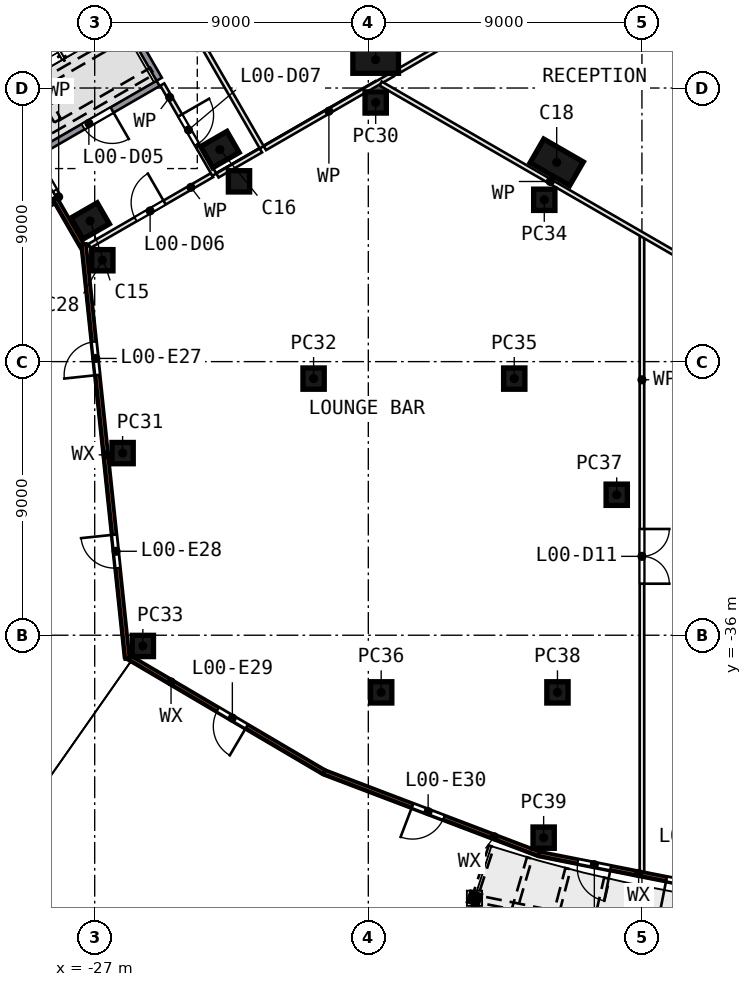
"""IFC4 building model, lengths in metres.
Left out: names, types, materials, properties, quantities, classifications, styles, units other than length and angle.
Written with IfcOpenShell. Run it as: python <this file> out.ifc"""

import sys

from ifc_helpers import new_model, si_unit, direction, frame, frame_2d, origin, origin_2d, place, context, subcontext, project, spatial, rectangle, hollow_rectangle, extrude, element, fill, save


model = new_model("IFC4")
c1 = context("Model", 3, precision=1e-05, world=origin(), true_north=direction((0.0, 1.0)))
c2 = subcontext(c1, "Body", "Model", "MODEL_VIEW")
j1 = project(units=[si_unit("LENGTHUNIT", "METRE"), si_unit("PLANEANGLEUNIT", "RADIAN")], contexts=[c1])
p1 = place(None, origin())
s1 = spatial("IfcSite", under=j1, at=p1, CompositionType="ELEMENT")
p2 = place(p1, origin())
s2 = spatial("IfcBuilding", under=s1, at=p2, CompositionType="ELEMENT")
p3 = place(p2, origin())
s3 = spatial("IfcBuildingStorey", under=s2, at=p3, CompositionType="ELEMENT", Elevation=0.0)
for number, where, z_axis, x_axis in (
    (1, (-27.151, -22.373, 0.0), (0.0, 0.0, 1.0), (0.866, 0.5, 0.0)),
    (2, (-22.883, -20.024, 0.0), (0.0, 0.0, 1.0), (0.866, 0.5, 0.0)),
):
    element("IfcColumn", number, at=place(p3, frame(where, z_axis=z_axis, x_axis=x_axis)), inside=s3, PredefinedType="COLUMN", context=c2, shape_type="SweptSolid", body=[
        extrude(rectangle(XDim=1.0, YDim=0.8, at=origin_2d()), origin(), (0.0, 0.0, 1.0), 7.55),
    ])
for number, where, z_axis, x_axis in (
    (3, (-17.758, -17.065, 0.0), (0.0, 0.0, 1.0), (-1.0, 0.0, 0.0)),
    (4, (-11.804, -20.445, 0.0), (0.0, 0.0, 1.0), (0.866, -0.5, 0.0)),
):
    element("IfcColumn", number, at=place(p3, frame(where, z_axis=z_axis, x_axis=x_axis)), inside=s3, PredefinedType="COLUMN", context=c2, shape_type="SweptSolid", body=[
        extrude(rectangle(XDim=1.5, YDim=0.9, at=origin_2d()), origin(), (0.0, 0.0, 1.0), 7.55),
    ])
for number, where, z_axis, x_axis in (
    (5, (-26.749, -23.665, 0.0), (0.0, 0.0, 1.0), (0.0, -1.0, 0.0)),
    (6, (-22.253, -21.07, 0.0), (0.0, 0.0, 1.0), (0.0, -1.0, 0.0)),
    (7, (-17.758, -18.474, 0.0), (0.0, 0.0, 1.0), (0.0, -1.0, 0.0)),
    (8, (-26.082, -30.009, 0.0), (0.0, 0.0, 1.0), (0.0, -1.0, 0.0)),
    (9, (-19.8, -27.558, 0.0), (0.0, 0.0, 1.0), (0.0, -1.0, 0.0)),
    (10, (-25.416, -36.353, 0.0), (0.0, 0.0, 1.0), (0.0, -1.0, 0.0)),
    (11, (-12.212, -21.676, 0.0), (0.0, 0.0, 1.0), (0.0, -1.0, 0.0)),
    (12, (-13.2, -27.558, 0.0), (0.0, 0.0, 1.0), (0.0, -1.0, 0.0)),
    (13, (-17.577, -37.88, 0.0), (0.0, 0.0, 1.0), (0.0, -1.0, 0.0)),
    (14, (-9.83, -31.379, 0.0), (0.0, 0.0, 1.0), (0.0, -1.0, 0.0)),
    (15, (-11.779, -37.88, 0.0), (0.0, 0.0, 1.0), (0.0, -1.0, 0.0)),
    (16, (-12.233, -42.658, 0.0), (0.0, 0.0, 1.0), (0.0, -1.0, 0.0)),
):
    element("IfcColumn", number, at=place(p3, frame(where, z_axis=z_axis, x_axis=x_axis)), inside=s3, PredefinedType="COLUMN", context=c2, shape_type="SweptSolid", body=[
        extrude(rectangle(XDim=0.7, YDim=0.7, at=origin_2d()), origin(), (0.0, 0.0, 1.0), 8.0),
    ])
p4 = place(p3, frame((-14.508, -44.652, -0.06), z_axis=(0.0, 0.0, 1.0), x_axis=(-0.309016994, -0.951056516, 0.0)))
e17 = element("IfcColumn", 17, at=p4, inside=s3, PredefinedType="COLUMN", context=c2, shape_type="SweptSolid", body=[
    extrude(hollow_rectangle(XDim=0.305, YDim=0.305, WallThickness=0.015, InnerFilletRadius=0.007, OuterFilletRadius=0.022, at=origin_2d()), origin(), (0.0, 0.0, 1.0), 5.453),
])
p5 = place(p3, frame((-29.78, -22.54, 0.0), z_axis=(0.0, 0.0, 1.0), x_axis=(0.865989634, 0.500061949, 0.0)))
e18 = element("IfcWall", 18, at=p5, inside=s3, PredefinedType="SOLIDWALL", context=c2, shape_type="SweptSolid", body=[
    extrude(rectangle(XDim=1.66, YDim=0.14, at=frame_2d((0.83, 0.0))), origin(), (0.0, 0.0, 1.0), 7.55),
])
p6 = place(p3, frame((-28.317, -21.614, 0.0), z_axis=(0.0, 0.0, 1.0), x_axis=(0.499983248, -0.866035075, 0.0)))
e19 = element("IfcWall", 19, at=p6, inside=s3, PredefinedType="SOLIDWALL", context=c2, shape_type="SweptSolid", body=[
    extrude(rectangle(XDim=1.783, YDim=0.14, at=frame_2d((0.891, 0.0))), origin(), (0.0, 0.0, 1.0), 7.55),
])
p7 = place(p3, frame((-25.925, -36.773, 0.0), z_axis=(0.0, 0.0, 1.0), x_axis=(-0.104443805, 0.99453079, 0.0)))
e20 = element("IfcWall", 20, at=p7, inside=s3, PredefinedType="SOLIDWALL", context=c2, shape_type="SweptSolid", body=[
    extrude(rectangle(XDim=13.712, YDim=0.14, at=frame_2d((6.856, 0.0))), origin(), (0.0, 0.0, 1.0), 7.55),
])
p8 = place(p7, frame((9.383, 0.0, 0.0)))
e21 = element("IfcOpeningElement", 21, at=p8, cuts=e20, PredefinedType="OPENING", context=c2, shape_type="SweptSolid", body=[
    extrude(rectangle(XDim=1.1, YDim=2.4, at=frame_2d((0.55, 1.2))), frame((0.0, 0.08, 0.0), z_axis=(0.0, -1.0, 0.0), x_axis=(1.0, 0.0, 0.0)), (0.0, 0.0, 1.0), 0.16),
])
p9 = place(p7, frame((3.004, 0.0, 0.0)))
e22 = element("IfcOpeningElement", 22, at=p9, cuts=e20, PredefinedType="OPENING", context=c2, shape_type="SweptSolid", body=[
    extrude(rectangle(XDim=1.1, YDim=2.4, at=frame_2d((0.55, 1.2))), frame((0.0, 0.08, 0.0), z_axis=(0.0, -1.0, 0.0), x_axis=(1.0, 0.0, 0.0)), (0.0, 0.0, 1.0), 0.16),
])
p10 = place(p3, frame((-19.442, -40.506, 0.0), z_axis=(0.0, 0.0, 1.0), x_axis=(-0.861885317, 0.507103244, 0.0)))
e23 = element("IfcWall", 23, at=p10, inside=s3, PredefinedType="SOLIDWALL", context=c2, shape_type="SweptSolid", body=[
    extrude(rectangle(XDim=7.445, YDim=0.14, at=frame_2d((3.723, 0.0))), origin(), (0.0, 0.0, 1.0), 7.55),
])
p11 = place(p10, frame((2.966, 0.0, 0.0)))
e24 = element("IfcOpeningElement", 24, at=p11, cuts=e23, PredefinedType="OPENING", context=c2, shape_type="SweptSolid", body=[
    extrude(rectangle(XDim=1.1, YDim=2.4, at=frame_2d((0.55, 1.2))), frame((0.0, 0.08, 0.0), z_axis=(0.0, -1.0, 0.0), x_axis=(1.0, 0.0, 0.0)), (0.0, 0.0, 1.0), 0.16),
])
p12 = place(p3, frame((-12.38, -43.191, 0.0), z_axis=(0.0, 0.0, 1.0), x_axis=(-0.934676196, 0.355500224, 0.0)))
e25 = element("IfcWall", 25, at=p12, inside=s3, PredefinedType="SOLIDWALL", context=c2, shape_type="SweptSolid", body=[
    extrude(rectangle(XDim=7.567, YDim=0.14, at=frame_2d((3.784, 0.0))), origin(), (0.0, 0.0, 1.0), 7.55),
])
p13 = place(p12, frame((3.358, 0.0, 0.0)))
e26 = element("IfcOpeningElement", 26, at=p13, cuts=e25, PredefinedType="OPENING", context=c2, shape_type="SweptSolid", body=[
    extrude(rectangle(XDim=1.1, YDim=2.4, at=frame_2d((0.55, 1.2))), frame((0.0, 0.08, 0.0), z_axis=(0.0, -1.0, 0.0), x_axis=(1.0, 0.0, 0.0)), (0.0, 0.0, 1.0), 0.16),
])
p14 = place(p3, frame((-4.967, -44.655, 0.0), z_axis=(0.0, 0.0, 1.0), x_axis=(-0.981028519, 0.193863469, 0.0)))
e27 = element("IfcWall", 27, at=p14, inside=s3, PredefinedType="SOLIDWALL", context=c2, shape_type="SweptSolid", body=[
    extrude(rectangle(XDim=7.567, YDim=0.14, at=frame_2d((3.784, 0.0))), origin(), (0.0, 0.0, 1.0), 7.55),
])
p15 = place(p14, frame((5.157, 0.0, 0.0)))
e28 = element("IfcOpeningElement", 28, at=p15, cuts=e27, PredefinedType="OPENING", context=c2, shape_type="SweptSolid", body=[
    extrude(rectangle(XDim=1.1, YDim=2.4, at=frame_2d((0.55, 1.2))), frame((0.0, 0.08, 0.0), z_axis=(0.0, -1.0, 0.0), x_axis=(1.0, 0.0, 0.0)), (0.0, 0.0, 1.0), 0.16),
])
p16 = place(p14, frame((1.088, 0.0, 0.0)))
e29 = element("IfcOpeningElement", 29, at=p16, cuts=e27, PredefinedType="OPENING", context=c2, shape_type="SweptSolid", body=[
    extrude(rectangle(XDim=2.2, YDim=2.4, at=frame_2d((1.1, 1.2))), frame((0.0, 0.08, 0.0), z_axis=(0.0, -1.0, 0.0), x_axis=(1.0, 0.0, 0.0)), (0.0, 0.0, 1.0), 0.16),
])
p17 = place(p3, frame((-28.162, -21.623, 0.0), z_axis=(0.0, 0.0, 1.0), x_axis=(-0.499877454, 0.866096144, 0.0)))
e30 = element("IfcWall", 30, at=p17, inside=s3, PredefinedType="PARTITIONING", context=c2, shape_type="SweptSolid", body=[
    extrude(rectangle(XDim=1.545, YDim=0.15, at=frame_2d((0.773, 0.0))), origin(), (0.0, 0.0, 1.0), 7.55),
])
p18 = place(p17, frame((0.295, 0.0, 0.0)))
e31 = element("IfcOpeningElement", 31, at=p18, cuts=e30, PredefinedType="OPENING", context=c2, shape_type="SweptSolid", body=[
    extrude(rectangle(XDim=1.1, YDim=2.1, at=frame_2d((0.55, 1.05))), frame((0.0, 0.085, 0.0), z_axis=(0.0, -1.0, 0.0), x_axis=(1.0, 0.0, 0.0)), (0.0, 0.0, 1.0), 0.17),
])
p19 = place(p3, frame((-24.914, -17.848, 0.0), z_axis=(0.0, 0.0, 1.0), x_axis=(-0.86601677, -0.500014953, 0.0)))
e32 = element("IfcWall", 32, at=p19, inside=s3, PredefinedType="SOLIDWALL", context=c2, shape_type="SweptSolid", body=[
    extrude(rectangle(XDim=4.6, YDim=0.2, at=frame_2d((2.3, 0.0))), origin(), (0.0, 0.0, 1.0), 7.55),
])
p20 = place(p19, frame((1.75, 0.0, 0.0)))
e33 = element("IfcOpeningElement", 33, at=p20, cuts=e32, PredefinedType="OPENING", context=c2, shape_type="SweptSolid", body=[
    extrude(rectangle(XDim=1.1, YDim=2.1, at=frame_2d((0.55, 1.05))), frame((0.0, 0.11, 0.0), z_axis=(0.0, -1.0, 0.0), x_axis=(1.0, 0.0, 0.0)), (0.0, 0.0, 1.0), 0.22),
])
p21 = place(p3, frame((-27.169, -23.192, 0.0), z_axis=(0.0, 0.0, 1.0), x_axis=(0.866011597, 0.500023913, 0.0)))
e34 = element("IfcWall", 34, at=p21, inside=s3, PredefinedType="PARTITIONING", context=c2, shape_type="SweptSolid", body=[
    extrude(rectangle(XDim=4.65, YDim=0.15, at=frame_2d((2.325, 0.0))), origin(), (0.0, 0.0, 1.0), 7.55),
])
p22 = place(p21, frame((1.75, 0.0, 0.0)))
e35 = element("IfcOpeningElement", 35, at=p22, cuts=e34, PredefinedType="OPENING", context=c2, shape_type="SweptSolid", body=[
    extrude(rectangle(XDim=1.1, YDim=2.1, at=frame_2d((0.55, 1.05))), frame((0.0, 0.085, 0.0), z_axis=(0.0, -1.0, 0.0), x_axis=(1.0, 0.0, 0.0)), (0.0, 0.0, 1.0), 0.17),
])
p23 = place(p3, frame((-24.877, -17.712, 0.0), z_axis=(0.0, 0.0, 1.0), x_axis=(-0.499984537, 0.866034331, 0.0)))
e36 = element("IfcWall", 36, at=p23, inside=s3, PredefinedType="SOLIDWALL", context=c2, shape_type="SweptSolid", body=[
    extrude(rectangle(XDim=9.3, YDim=0.2, at=frame_2d((4.65, 0.0))), origin(), (0.0, 0.0, 1.0), 7.55),
])
p24 = place(p3, frame((-24.777, -17.885, 0.0), z_axis=(0.0, 0.0, 1.0), x_axis=(0.500041249, -0.866001587, 0.0)))
e37 = element("IfcWall", 37, at=p24, inside=s3, PredefinedType="PARTITIONING", context=c2, shape_type="SweptSolid", body=[
    extrude(rectangle(XDim=3.425, YDim=0.15, at=frame_2d((1.712, 0.0))), origin(), (0.0, 0.0, 1.0), 7.55),
])
p25 = place(p24, frame((1.175, 0.0, 0.0)))
e38 = element("IfcOpeningElement", 38, at=p25, cuts=e37, PredefinedType="OPENING", context=c2, shape_type="SweptSolid", body=[
    extrude(rectangle(XDim=1.1, YDim=2.1, at=frame_2d((0.55, 1.05))), frame((0.0, 0.085, 0.0), z_axis=(0.0, -1.0, 0.0), x_axis=(1.0, 0.0, 0.0)), (0.0, 0.0, 1.0), 0.17),
])
p26 = place(p3, frame((-22.962, -20.878, 0.0), z_axis=(0.0, 0.0, 1.0), x_axis=(0.866040212, 0.499974351, 0.0)))
e39 = element("IfcWall", 39, at=p26, inside=s3, PredefinedType="PARTITIONING", context=c2, shape_type="SweptSolid", body=[
    extrude(rectangle(XDim=1.65, YDim=0.15, at=frame_2d((0.825, 0.0))), origin(), (0.0, 0.0, 1.0), 7.55),
])
p27 = place(p3, frame((-21.506, -19.951, 0.0), z_axis=(0.0, 0.0, 1.0), x_axis=(-0.499998298, 0.866026387, 0.0)))
e40 = element("IfcWall", 40, at=p27, inside=s3, PredefinedType="PARTITIONING", context=c2, shape_type="SweptSolid", body=[
    extrude(rectangle(XDim=13.05, YDim=0.15, at=frame_2d((6.525, 0.0))), origin(), (0.0, 0.0, 1.0), 7.55),
])
p28 = place(p27, frame((5.55, 0.0, 0.0)))
e41 = element("IfcOpeningElement", 41, at=p28, cuts=e40, PredefinedType="OPENING", context=c2, shape_type="SweptSolid", body=[
    extrude(rectangle(XDim=1.8, YDim=2.1, at=frame_2d((0.9, 1.05))), frame((0.0, 0.085, 0.0), z_axis=(0.0, -1.0, 0.0), x_axis=(1.0, 0.0, 0.0)), (0.0, 0.0, 1.0), 0.17),
])
p29 = place(p3, frame((-21.404, -19.979, 0.0), z_axis=(0.0, 0.0, 1.0), x_axis=(0.866005103, 0.50003516, 0.0)))
e42 = element("IfcWall", 42, at=p29, inside=s3, PredefinedType="PARTITIONING", context=c2, shape_type="SweptSolid", body=[
    extrude(rectangle(XDim=4.866, YDim=0.15, at=frame_2d((2.433, 0.0))), origin(), (0.0, 0.0, 1.0), 7.55),
])
p30 = place(p3, frame((-16.978, -17.424, 0.0), z_axis=(0.0, 0.0, 1.0), x_axis=(0.866016603, 0.500015243, 0.0)))
e43 = element("IfcWall", 43, at=p30, inside=s3, PredefinedType="PARTITIONING", context=c2, shape_type="SweptSolid", body=[
    extrude(rectangle(XDim=5.582, YDim=0.15, at=frame_2d((2.791, 0.0))), origin(), (0.0, 0.0, 1.0), 7.55),
])
p31 = place(p3, frame((-9.0, -22.89, 0.0), z_axis=(0.0, 0.0, 1.0), x_axis=(0.0, -1.0, 0.0)))
e44 = element("IfcWall", 44, at=p31, inside=s3, PredefinedType="PARTITIONING", context=c2, shape_type="SweptSolid", body=[
    extrude(rectangle(XDim=20.965, YDim=0.15, at=frame_2d((10.482, 0.0))), origin(), (0.0, 0.0, 1.0), 7.55),
])
p32 = place(p31, frame((9.615, 0.0, 0.0)))
e45 = element("IfcOpeningElement", 45, at=p32, cuts=e44, PredefinedType="OPENING", context=c2, shape_type="SweptSolid", body=[
    extrude(rectangle(XDim=1.8, YDim=2.1, at=frame_2d((0.9, 1.05))), frame((0.0, 0.085, 0.0), z_axis=(0.0, -1.0, 0.0), x_axis=(1.0, 0.0, 0.0)), (0.0, 0.0, 1.0), 0.17),
])
p33 = place(p3, frame((-6.435, -24.296, 0.0), z_axis=(0.0, 0.0, 1.0), x_axis=(-0.866023714, 0.500002927, 0.0)))
e46 = element("IfcWall", 46, at=p33, inside=s3, PredefinedType="PARTITIONING", context=c2, shape_type="SweptSolid", body=[
    extrude(rectangle(XDim=12.885, YDim=0.15, at=frame_2d((6.442, 0.0))), origin(), (0.0, 0.0, 1.0), 7.55),
])
p34 = place(p3, frame((-4.823, -17.721, 0.0), z_axis=(0.0, 0.0, 1.0), x_axis=(-0.866037142, 0.499979668, 0.0)))
e47 = element("IfcWall", 47, at=p34, inside=s3, PredefinedType="PARTITIONING", context=c2, shape_type="SweptSolid", body=[
    extrude(rectangle(XDim=9.367, YDim=0.15, at=frame_2d((4.683, 0.0))), origin(), (0.0, 0.0, 1.0), 7.55),
])
p35 = place(p8, origin())
e48 = element("IfcDoor", 48, at=p35, inside=s3, OperationType="SINGLE_SWING_LEFT", PredefinedType="DOOR", context=c2, shape_type="SweptSolid", body=[
    extrude(rectangle(XDim=1.1, YDim=2.4, at=frame_2d((0.55, 1.2))), frame((0.0, 0.025, 0.0), z_axis=(0.0, -1.0, 0.0), x_axis=(1.0, 0.0, 0.0)), (0.0, 0.0, 1.0), 0.05),
])
fill(e21, e48)
p36 = place(p9, origin())
e49 = element("IfcDoor", 49, at=p36, inside=s3, OperationType="SINGLE_SWING_RIGHT", PredefinedType="DOOR", context=c2, shape_type="SweptSolid", body=[
    extrude(rectangle(XDim=1.1, YDim=2.4, at=frame_2d((0.55, 1.2))), frame((0.0, 0.025, 0.0), z_axis=(0.0, -1.0, 0.0), x_axis=(1.0, 0.0, 0.0)), (0.0, 0.0, 1.0), 0.05),
])
fill(e22, e49)
p37 = place(p11, origin())
e50 = element("IfcDoor", 50, at=p37, inside=s3, OperationType="SINGLE_SWING_LEFT", PredefinedType="DOOR", context=c2, shape_type="SweptSolid", body=[
    extrude(rectangle(XDim=1.1, YDim=2.4, at=frame_2d((0.55, 1.2))), frame((0.0, 0.025, 0.0), z_axis=(0.0, -1.0, 0.0), x_axis=(1.0, 0.0, 0.0)), (0.0, 0.0, 1.0), 0.05),
])
fill(e24, e50)
p38 = place(p13, origin())
e51 = element("IfcDoor", 51, at=p38, inside=s3, OperationType="SINGLE_SWING_RIGHT", PredefinedType="DOOR", context=c2, shape_type="SweptSolid", body=[
    extrude(rectangle(XDim=1.1, YDim=2.4, at=frame_2d((0.55, 1.2))), frame((0.0, 0.025, 0.0), z_axis=(0.0, -1.0, 0.0), x_axis=(1.0, 0.0, 0.0)), (0.0, 0.0, 1.0), 0.05),
])
fill(e26, e51)
p39 = place(p15, origin())
e52 = element("IfcDoor", 52, at=p39, inside=s3, OperationType="SINGLE_SWING_LEFT", PredefinedType="DOOR", context=c2, shape_type="SweptSolid", body=[
    extrude(rectangle(XDim=1.1, YDim=2.4, at=frame_2d((0.55, 1.2))), frame((0.0, 0.025, 0.0), z_axis=(0.0, -1.0, 0.0), x_axis=(1.0, 0.0, 0.0)), (0.0, 0.0, 1.0), 0.05),
])
fill(e28, e52)
p40 = place(p16, origin())
e53 = element("IfcDoor", 53, at=p40, inside=s3, OperationType="DOUBLE_DOOR_SINGLE_SWING", PredefinedType="DOOR", context=c2, shape_type="SweptSolid", body=[
    extrude(rectangle(XDim=2.2, YDim=2.4, at=frame_2d((1.1, 1.2))), frame((0.0, 0.025, 0.0), z_axis=(0.0, -1.0, 0.0), x_axis=(1.0, 0.0, 0.0)), (0.0, 0.0, 1.0), 0.05),
])
fill(e29, e53)
p41 = place(p18, origin())
e54 = element("IfcDoor", 54, at=p41, inside=s3, OperationType="SINGLE_SWING_RIGHT", PredefinedType="DOOR", context=c2, shape_type="SweptSolid", body=[
    extrude(rectangle(XDim=1.1, YDim=2.1, at=frame_2d((0.55, 1.05))), frame((0.0, 0.025, 0.0), z_axis=(0.0, -1.0, 0.0), x_axis=(1.0, 0.0, 0.0)), (0.0, 0.0, 1.0), 0.05),
])
fill(e31, e54)
p42 = place(p20, origin())
e55 = element("IfcDoor", 55, at=p42, inside=s3, OperationType="SINGLE_SWING_LEFT", PredefinedType="DOOR", context=c2, shape_type="SweptSolid", body=[
    extrude(rectangle(XDim=1.1, YDim=2.1, at=frame_2d((0.55, 1.05))), frame((0.0, 0.025, 0.0), z_axis=(0.0, -1.0, 0.0), x_axis=(1.0, 0.0, 0.0)), (0.0, 0.0, 1.0), 0.05),
])
fill(e33, e55)
p43 = place(p22, origin())
e56 = element("IfcDoor", 56, at=p43, inside=s3, OperationType="SINGLE_SWING_RIGHT", PredefinedType="DOOR", context=c2, shape_type="SweptSolid", body=[
    extrude(rectangle(XDim=1.1, YDim=2.1, at=frame_2d((0.55, 1.05))), frame((0.0, 0.025, 0.0), z_axis=(0.0, -1.0, 0.0), x_axis=(1.0, 0.0, 0.0)), (0.0, 0.0, 1.0), 0.05),
])
fill(e35, e56)
p44 = place(p25, origin())
e57 = element("IfcDoor", 57, at=p44, inside=s3, OperationType="SINGLE_SWING_LEFT", PredefinedType="DOOR", context=c2, shape_type="SweptSolid", body=[
    extrude(rectangle(XDim=1.1, YDim=2.1, at=frame_2d((0.55, 1.05))), frame((0.0, 0.025, 0.0), z_axis=(0.0, -1.0, 0.0), x_axis=(1.0, 0.0, 0.0)), (0.0, 0.0, 1.0), 0.05),
])
fill(e38, e57)
p45 = place(p32, origin())
e58 = element("IfcDoor", 58, at=p45, inside=s3, OperationType="DOUBLE_DOOR_SINGLE_SWING", PredefinedType="DOOR", context=c2, shape_type="SweptSolid", body=[
    extrude(rectangle(XDim=1.8, YDim=2.1, at=frame_2d((0.9, 1.05))), frame((0.0, 0.025, 0.0), z_axis=(0.0, -1.0, 0.0), x_axis=(1.0, 0.0, 0.0)), (0.0, 0.0, 1.0), 0.05),
])
fill(e45, e58)
save(model, sys.argv[1])
